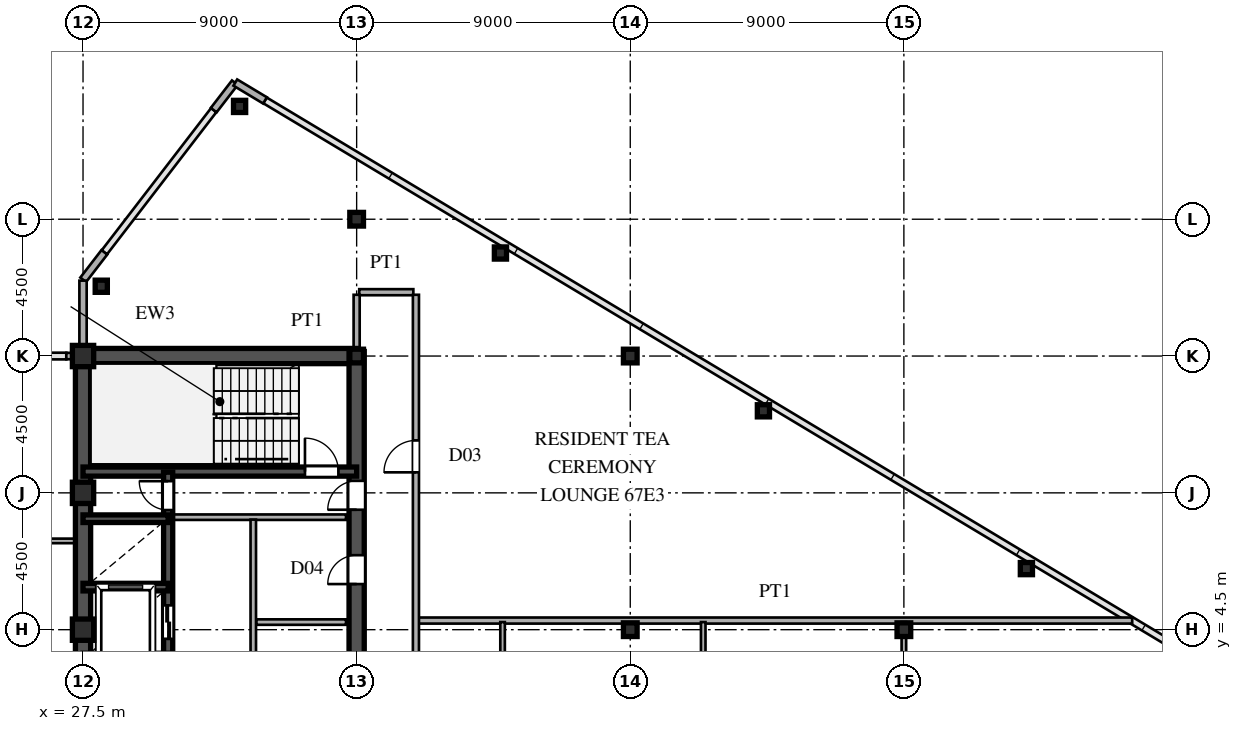
"""IFC4 building model, lengths in metres.
Left out: names, types, materials, properties, quantities, classifications, styles, units other than length and angle.
Written with IfcOpenShell. Run it as: python <this file> out.ifc"""

import sys

from ifc_helpers import new_model, si_unit, direction, frame, frame_2d, origin, origin_2d, place, context, subcontext, project, spatial, rectangle, hollow_rectangle, i_section, extrude, source, transform, mapped, element, fill, save


model = new_model("IFC4")
c1 = context("Model", 3, precision=1e-05, world=origin(), true_north=direction((0.0, 1.0)))
c2 = subcontext(c1, "Body", "Model", "MODEL_VIEW")
j1 = project(units=[si_unit("LENGTHUNIT", "METRE"), si_unit("PLANEANGLEUNIT", "RADIAN")], contexts=[c1])
p1 = place(None, origin())
s1 = spatial("IfcSite", under=j1, at=p1, CompositionType="ELEMENT")
p2 = place(p1, origin())
s2 = spatial("IfcBuilding", under=s1, at=p2, CompositionType="ELEMENT")
p3 = place(p2, frame((0.0, 0.0, 254.4)))
s3 = spatial("IfcBuildingStorey", under=s2, at=p3, CompositionType="ELEMENT", Elevation=254.4)
m1 = source(origin(), c2, "Body", "SweptSolid", [
    extrude(hollow_rectangle(XDim=0.7, YDim=0.7, WallThickness=0.03, at=origin_2d()), origin(), (0.0, 0.0, 1.0), 3.75),
])
for number, where, z_axis, x_axis in (
    (1, (27.5, 4.5, 0.0), (0.0, 0.0, 1.0), (1.0, 0.0, 0.0)),
    (2, (27.5, 9.0, 0.0), (0.0, 0.0, 1.0), (1.0, 0.0, 0.0)),
    (3, (27.5, 13.5, 0.0), (0.0, 0.0, 1.0), (1.0, 0.0, 0.0)),
):
    element("IfcColumn", number, at=place(p3, frame(where, z_axis=z_axis, x_axis=x_axis)), inside=s3, PredefinedType="COLUMN", context=c2, shape_type="MappedRepresentation", body=[
        mapped(m1, transform((0.0, 0.0, 0.0), scale=1.0)),
    ])
m2 = source(origin(), c2, "Body", "SweptSolid", [
    extrude(i_section(OverallWidth=0.45, OverallDepth=0.45, WebThickness=0.016, FlangeThickness=0.025, at=origin_2d()), origin(), (0.0, 0.0, 1.0), 3.75),
])
for number, where, z_axis, x_axis in (
    (4, (36.5, 13.5, 0.0), (0.0, 0.0, 1.0), (1.0, 0.0, 0.0)),
    (5, (36.5, 18.0, 0.0), (0.0, 0.0, 1.0), (1.0, 0.0, 0.0)),
    (6, (45.5, 4.5, 0.0), (0.0, 0.0, 1.0), (1.0, 0.0, 0.0)),
    (7, (45.5, 13.5, 0.0), (0.0, 0.0, 1.0), (1.0, 0.0, 0.0)),
    (8, (54.5, 4.5, 0.0), (0.0, 0.0, 1.0), (1.0, 0.0, 0.0)),
):
    element("IfcColumn", number, at=place(p3, frame(where, z_axis=z_axis, x_axis=x_axis)), inside=s3, PredefinedType="COLUMN", context=c2, shape_type="MappedRepresentation", body=[
        mapped(m2, transform((0.0, 0.0, 0.0), scale=1.0)),
    ])
m3 = source(origin(), c2, "Body", "SweptSolid", [
    extrude(hollow_rectangle(XDim=0.4, YDim=0.4, WallThickness=0.016, at=origin_2d()), origin(), (0.0, 0.0, 1.0), 3.75),
])
for number, where, z_axis, x_axis in (
    (9, (32.65, 21.71, 0.0), (0.0, 0.0, 1.0), (1.0, 0.0, 0.0)),
    (10, (28.1, 15.796, 0.0), (0.0, 0.0, 1.0), (1.0, 0.0, 0.0)),
    (11, (41.23, 16.889, 0.0), (0.0, 0.0, 1.0), (1.0, 0.0, 0.0)),
    (12, (49.88, 11.699, 0.0), (0.0, 0.0, 1.0), (1.0, 0.0, 0.0)),
    (13, (58.53, 6.509, 0.0), (0.0, 0.0, 1.0), (1.0, 0.0, 0.0)),
):
    element("IfcColumn", number, at=place(p3, frame(where, z_axis=z_axis, x_axis=x_axis)), inside=s3, PredefinedType="COLUMN", context=c2, shape_type="MappedRepresentation", body=[
        mapped(m3, transform((0.0, 0.0, 0.0), scale=1.0)),
    ])
for number, where, z_axis, x_axis in (
    (14, (33.486, 21.908, 0.0), (0.0, 0.0, 1.0), (-0.857, 0.515, 0.0)),
    (15, (32.494, 22.492, 0.0), (0.0, 0.0, 1.0), (-0.61, -0.793, 0.0)),
    (16, (28.201, 16.912, 0.0), (0.0, 0.0, 1.0), (-0.61, -0.793, 0.0)),
):
    element("IfcWall", number, at=place(p3, frame(where, z_axis=z_axis, x_axis=x_axis)), inside=s3, PredefinedType="SOLIDWALL", context=c2, shape_type="SweptSolid", body=[
        extrude(rectangle(XDim=1.14, YDim=0.24, at=frame_2d((0.57, 0.0))), origin(), (0.0, 0.0, 1.0), 3.53),
    ])
p4 = place(p3, frame((27.5, 13.755, 0.0), z_axis=(0.0, 0.0, 1.0), x_axis=(0.0, 1.0, 0.0)))
e17 = element("IfcWall", 17, at=p4, inside=s3, PredefinedType="SOLIDWALL", context=c2, shape_type="SweptSolid", body=[
    extrude(rectangle(XDim=0.62, YDim=0.24, at=frame_2d((0.31, 0.0))), origin(), (0.0, 0.0, 1.0), 3.03),
])
p5 = place(p3, frame((27.5, 14.375, 0.0), z_axis=(0.0, 0.0, 1.0), x_axis=(0.0, 1.0, 0.0)))
e18 = element("IfcWall", 18, at=p5, inside=s3, PredefinedType="SOLIDWALL", context=c2, shape_type="SweptSolid", body=[
    extrude(rectangle(XDim=1.605, YDim=0.24, at=frame_2d((0.803, 0.0))), origin(), (0.0, 0.0, 1.0), 3.53),
])
p6 = place(p3, frame((26.95, 13.5, 0.0), z_axis=(0.0, 0.0, 1.0), x_axis=(1.0, 0.0, 0.0)))
e19 = element("IfcWall", 19, at=p6, inside=s3, PredefinedType="SOLIDWALL", context=c2, shape_type="SweptSolid", body=[
    extrude(rectangle(XDim=0.54, YDim=0.21, at=frame_2d((0.27, 0.0))), origin(), (0.0, 0.0, 1.0), 3.03),
])
p7 = place(p3, frame((27.5, 1.3, 0.0), z_axis=(0.0, 0.0, 1.0), x_axis=(0.0, 1.0, 0.0)))
e20 = element("IfcWall", 20, at=p7, inside=s3, PredefinedType="SHEAR", context=c2, shape_type="SweptSolid", body=[
    extrude(rectangle(XDim=12.2, YDim=0.5, at=frame_2d((6.1, 0.0))), origin(), (0.0, 0.0, 1.0), 3.53),
])
p8 = place(p3, frame((27.5, 13.5, 0.0), z_axis=(0.0, 0.0, 1.0), x_axis=(1.0, 0.0, 0.0)))
e21 = element("IfcWall", 21, at=p8, inside=s3, PredefinedType="SHEAR", context=c2, shape_type="SweptSolid", body=[
    extrude(rectangle(XDim=9.0, YDim=0.5, at=frame_2d((4.5, 0.0))), origin(), (0.0, 0.0, 1.0), 3.53),
])
p9 = place(p3, frame((36.5, 8.2, 0.0), z_axis=(0.0, 0.0, 1.0), x_axis=(0.0, 1.0, 0.0)))
e22 = element("IfcWall", 22, at=p9, inside=s3, PredefinedType="SHEAR", context=c2, shape_type="SweptSolid", body=[
    extrude(rectangle(XDim=5.45, YDim=0.5, at=frame_2d((2.725, 0.0))), origin(), (0.0, 0.0, 1.0), 3.53),
])
p10 = place(p9, frame((0.245, 0.0, 0.0)))
e23 = element("IfcOpeningElement", 23, at=p10, cuts=e22, PredefinedType="OPENING", context=c2, shape_type="SweptSolid", body=[
    extrude(rectangle(XDim=0.95, YDim=2.15, at=frame_2d((0.475, 1.075))), frame((0.0, 0.26, 0.0), z_axis=(0.0, -1.0, 0.0), x_axis=(1.0, 0.0, 0.0)), (0.0, 0.0, 1.0), 0.52),
])
p11 = place(p3, frame((36.5, 1.3, 0.0), z_axis=(0.0, 0.0, 1.0), x_axis=(0.0, 1.0, 0.0)))
e24 = element("IfcWall", 24, at=p11, inside=s3, PredefinedType="SHEAR", context=c2, shape_type="SweptSolid", body=[
    extrude(rectangle(XDim=3.45, YDim=0.5, at=frame_2d((1.725, 0.0))), origin(), (0.0, 0.0, 1.0), 3.53),
])
p12 = place(p11, frame((1.25, 0.0, 0.0)))
e25 = element("IfcOpeningElement", 25, at=p12, cuts=e24, PredefinedType="OPENING", context=c2, shape_type="SweptSolid", body=[
    extrude(rectangle(XDim=0.95, YDim=2.15, at=frame_2d((0.475, 1.075))), frame((0.0, 0.26, 0.0), z_axis=(0.0, -1.0, 0.0), x_axis=(1.0, 0.0, 0.0)), (0.0, 0.0, 1.0), 0.52),
])
p13 = place(p3, frame((36.5, 4.75, 0.0), z_axis=(0.0, 0.0, 1.0), x_axis=(0.0, 1.0, 0.0)))
e26 = element("IfcWall", 26, at=p13, inside=s3, PredefinedType="SHEAR", context=c2, shape_type="SweptSolid", body=[
    extrude(rectangle(XDim=3.45, YDim=0.5, at=frame_2d((1.725, 0.0))), origin(), (0.0, 0.0, 1.0), 3.53),
])
p14 = place(p13, frame((1.25, 0.0, 0.0)))
e27 = element("IfcOpeningElement", 27, at=p14, cuts=e26, PredefinedType="OPENING", context=c2, shape_type="SweptSolid", body=[
    extrude(rectangle(XDim=0.95, YDim=2.15, at=frame_2d((0.475, 1.075))), frame((0.0, 0.26, 0.0), z_axis=(0.0, -1.0, 0.0), x_axis=(1.0, 0.0, 0.0)), (0.0, 0.0, 1.0), 0.52),
])
p15 = place(p3, frame((27.5, 9.7, 0.0), z_axis=(0.0, 0.0, 1.0), x_axis=(1.0, 0.0, 0.0)))
e28 = element("IfcWall", 28, at=p15, inside=s3, PredefinedType="SHEAR", context=c2, shape_type="SweptSolid", body=[
    extrude(rectangle(XDim=9.0, YDim=0.3, at=frame_2d((4.5, 0.0))), origin(), (0.0, 0.0, 1.0), 3.53),
])
p16 = place(p15, frame((7.3, 0.0, 0.0)))
e29 = element("IfcOpeningElement", 29, at=p16, cuts=e28, PredefinedType="OPENING", context=c2, shape_type="SweptSolid", body=[
    extrude(rectangle(XDim=1.1, YDim=2.2, at=frame_2d((0.55, 1.1))), frame((0.0, 0.16, 0.0), z_axis=(0.0, -1.0, 0.0), x_axis=(1.0, 0.0, 0.0)), (0.0, 0.0, 1.0), 0.32),
])
for number, where, z_axis, x_axis in (
    (30, (27.5, 5.9, 0.0), (0.0, 0.0, 1.0), (1.0, 0.0, 0.0)),
    (31, (27.5, 8.15, 0.0), (0.0, 0.0, 1.0), (1.0, 0.0, 0.0)),
):
    element("IfcWall", number, at=place(p3, frame(where, z_axis=z_axis, x_axis=x_axis)), inside=s3, PredefinedType="SHEAR", context=c2, shape_type="SweptSolid", body=[
        extrude(rectangle(XDim=2.8, YDim=0.25, at=frame_2d((1.4, 0.0))), origin(), (0.0, 0.0, 1.0), 3.53),
    ])
p17 = place(p3, frame((30.3, 3.6, 0.0), z_axis=(0.0, 0.0, 1.0), x_axis=(0.0, 1.0, 0.0)))
e32 = element("IfcWall", 32, at=p17, inside=s3, PredefinedType="SHEAR", context=c2, shape_type="SweptSolid", body=[
    extrude(rectangle(XDim=2.3, YDim=0.3, at=frame_2d((1.15, 0.0))), origin(), (0.0, 0.0, 1.0), 3.53),
])
p18 = place(p17, frame((0.6, 0.0, 0.0)))
e33 = element("IfcOpeningElement", 33, at=p18, cuts=e32, PredefinedType="OPENING", context=c2, shape_type="SweptSolid", body=[
    extrude(rectangle(XDim=1.1, YDim=2.2, at=frame_2d((0.55, 1.1))), frame((0.0, 0.16, 0.0), z_axis=(0.0, -1.0, 0.0), x_axis=(1.0, 0.0, 0.0)), (0.0, 0.0, 1.0), 0.32),
])
p19 = place(p3, frame((30.3, 5.9, 0.0), z_axis=(0.0, 0.0, 1.0), x_axis=(0.0, 1.0, 0.0)))
e34 = element("IfcWall", 34, at=p19, inside=s3, PredefinedType="SHEAR", context=c2, shape_type="SweptSolid", body=[
    extrude(rectangle(XDim=2.25, YDim=0.3, at=frame_2d((1.125, 0.0))), origin(), (0.0, 0.0, 1.0), 3.53),
])
p20 = place(p3, frame((30.3, 8.15, 0.0), z_axis=(0.0, 0.0, 1.0), x_axis=(0.0, 1.0, 0.0)))
e35 = element("IfcWall", 35, at=p20, inside=s3, PredefinedType="SHEAR", context=c2, shape_type="SweptSolid", body=[
    extrude(rectangle(XDim=1.53, YDim=0.3, at=frame_2d((0.765, 0.0))), origin(), (0.0, 0.0, 1.0), 3.53),
])
p21 = place(p20, frame((0.285, 0.0, 0.0)))
e36 = element("IfcOpeningElement", 36, at=p21, cuts=e35, PredefinedType="OPENING", context=c2, shape_type="SweptSolid", body=[
    extrude(rectangle(XDim=0.95, YDim=2.15, at=frame_2d((0.475, 1.075))), frame((0.0, 0.16, 0.0), z_axis=(0.0, -1.0, 0.0), x_axis=(1.0, 0.0, 0.0)), (0.0, 0.0, 1.0), 0.32),
])
p22 = place(p3, frame((30.45, 8.2, 0.0), z_axis=(0.0, 0.0, 1.0), x_axis=(1.0, 0.0, 0.0)))
e37 = element("IfcWall", 37, at=p22, inside=s3, PredefinedType="PARTITIONING", context=c2, shape_type="SweptSolid", body=[
    extrude(rectangle(XDim=5.7, YDim=0.18, at=frame_2d((2.85, 0.0))), origin(), (0.0, 0.0, 1.0), 3.53),
])
p23 = place(p3, frame((33.1, 1.38, 0.0), z_axis=(0.0, 0.0, 1.0), x_axis=(0.0, 1.0, 0.0)))
e38 = element("IfcWall", 38, at=p23, inside=s3, PredefinedType="PARTITIONING", context=c2, shape_type="SweptSolid", body=[
    extrude(rectangle(XDim=6.74, YDim=0.18, at=frame_2d((3.37, 0.0))), origin(), (0.0, 0.0, 1.0), 3.53),
])
p24 = place(p3, frame((33.2, 4.75, 0.0), z_axis=(0.0, 0.0, 1.0), x_axis=(1.0, 0.0, 0.0)))
e39 = element("IfcWall", 39, at=p24, inside=s3, PredefinedType="PARTITIONING", context=c2, shape_type="SweptSolid", body=[
    extrude(rectangle(XDim=2.95, YDim=0.18, at=frame_2d((1.475, 0.0))), origin(), (0.0, 0.0, 1.0), 3.53),
])
p25 = place(p3, frame((38.53, 4.8, 0.0), z_axis=(0.0, 0.0, 1.0), x_axis=(1.0, 0.0, 0.0)))
e40 = element("IfcWall", 40, at=p25, inside=s3, PredefinedType="PARTITIONING", context=c2, shape_type="SweptSolid", body=[
    extrude(rectangle(XDim=23.48, YDim=0.2, at=frame_2d((11.74, 0.0))), origin(), (0.0, 0.0, 1.0), 3.53),
])
p26 = place(p3, frame((7.085, 7.42, 0.0), z_axis=(0.0, 0.0, 1.0), x_axis=(1.0, 0.0, 0.0)))
e41 = element("IfcWall", 41, at=p26, inside=s3, PredefinedType="PARTITIONING", context=c2, shape_type="SweptSolid", body=[
    extrude(rectangle(XDim=20.16, YDim=0.15, at=frame_2d((10.08, 0.0))), origin(), (0.0, 0.0, 1.0), 3.53),
])
p27 = place(p26, frame((3.44, 0.0, 0.0)))
e42 = element("IfcOpeningElement", 42, at=p27, cuts=e41, PredefinedType="OPENING", context=c2, shape_type="SweptSolid", body=[
    extrude(rectangle(XDim=0.95, YDim=2.15, at=frame_2d((0.475, 1.075))), frame((0.0, 0.085, 0.0), z_axis=(0.0, -1.0, 0.0), x_axis=(1.0, 0.0, 0.0)), (0.0, 0.0, 1.0), 0.17),
])
p28 = place(p26, frame((10.69, 0.0, 0.0)))
e43 = element("IfcOpeningElement", 43, at=p28, cuts=e41, PredefinedType="OPENING", context=c2, shape_type="SweptSolid", body=[
    extrude(rectangle(XDim=0.95, YDim=2.15, at=frame_2d((0.475, 1.075))), frame((0.0, 0.085, 0.0), z_axis=(0.0, -1.0, 0.0), x_axis=(1.0, 0.0, 0.0)), (0.0, 0.0, 1.0), 0.17),
])
p29 = place(p26, frame((16.94, 0.0, 0.0)))
e44 = element("IfcOpeningElement", 44, at=p29, cuts=e41, PredefinedType="OPENING", context=c2, shape_type="SweptSolid", body=[
    extrude(rectangle(XDim=0.95, YDim=2.15, at=frame_2d((0.475, 1.075))), frame((0.0, 0.085, 0.0), z_axis=(0.0, -1.0, 0.0), x_axis=(1.0, 0.0, 0.0)), (0.0, 0.0, 1.0), 0.17),
])
p30 = place(p3, frame((36.585, 15.6, 0.0), z_axis=(0.0, 0.0, 1.0), x_axis=(1.0, 0.0, 0.0)))
e45 = element("IfcWall", 45, at=p30, inside=s3, PredefinedType="PARTITIONING", context=c2, shape_type="SweptSolid", body=[
    extrude(rectangle(XDim=1.78, YDim=0.2, at=frame_2d((0.89, 0.0))), origin(), (0.0, 0.0, 1.0), 3.53),
])
p31 = place(p3, frame((36.5, 13.755, 0.0), z_axis=(0.0, 0.0, 1.0), x_axis=(0.0, 1.0, 0.0)))
e46 = element("IfcWall", 46, at=p31, inside=s3, PredefinedType="PARTITIONING", context=c2, shape_type="SweptSolid", body=[
    extrude(rectangle(XDim=1.76, YDim=0.2, at=frame_2d((0.88, 0.0))), origin(), (0.0, 0.0, 1.0), 2.93),
])
p32 = place(p3, frame((38.45, -15.515, 0.0), z_axis=(0.0, 0.0, 1.0), x_axis=(0.0, 1.0, 0.0)))
e47 = element("IfcWall", 47, at=p32, inside=s3, PredefinedType="PARTITIONING", context=c2, shape_type="SweptSolid", body=[
    extrude(rectangle(XDim=31.03, YDim=0.2, at=frame_2d((15.515, 0.0))), origin(), (0.0, 0.0, 1.0), 3.53),
])
p33 = place(p32, frame((3.09, 0.0, 0.0)))
e48 = element("IfcOpeningElement", 48, at=p33, cuts=e47, PredefinedType="OPENING", context=c2, shape_type="SweptSolid", body=[
    extrude(rectangle(XDim=1.05, YDim=2.25, at=frame_2d((0.525, 1.125))), frame((0.0, 0.11, 0.0), z_axis=(0.0, -1.0, 0.0), x_axis=(1.0, 0.0, 0.0)), (0.0, 0.0, 1.0), 0.22),
])
p34 = place(p32, frame((13.095, 0.0, 0.0)))
e49 = element("IfcOpeningElement", 49, at=p34, cuts=e47, PredefinedType="OPENING", context=c2, shape_type="SweptSolid", body=[
    extrude(rectangle(XDim=1.05, YDim=2.25, at=frame_2d((0.525, 1.125))), frame((0.0, 0.11, 0.0), z_axis=(0.0, -1.0, 0.0), x_axis=(1.0, 0.0, 0.0)), (0.0, 0.0, 1.0), 0.22),
])
p35 = place(p32, frame((25.19, 0.0, 0.0)))
e50 = element("IfcOpeningElement", 50, at=p35, cuts=e47, PredefinedType="OPENING", context=c2, shape_type="SweptSolid", body=[
    extrude(rectangle(XDim=1.05, YDim=2.25, at=frame_2d((0.525, 1.125))), frame((0.0, 0.11, 0.0), z_axis=(0.0, -1.0, 0.0), x_axis=(1.0, 0.0, 0.0)), (0.0, 0.0, 1.0), 0.22),
])
p36 = place(p3, frame((41.3, 0.952, 0.0), z_axis=(0.0, 0.0, 1.0), x_axis=(0.0, 1.0, 0.0)))
e51 = element("IfcWall", 51, at=p36, inside=s3, PredefinedType="PARTITIONING", context=c2, shape_type="SweptSolid", body=[
    extrude(rectangle(XDim=3.798, YDim=0.15, at=frame_2d((1.899, 0.0))), origin(), (0.0, 0.0, 1.0), 3.53),
])
p37 = place(p3, frame((47.9, -8.15, 0.0), z_axis=(0.0, 0.0, 1.0), x_axis=(0.0, 1.0, 0.0)))
e52 = element("IfcWall", 52, at=p37, inside=s3, PredefinedType="PARTITIONING", context=c2, shape_type="SweptSolid", body=[
    extrude(rectangle(XDim=12.9, YDim=0.15, at=frame_2d((6.45, 0.0))), origin(), (0.0, 0.0, 1.0), 3.53),
])
p38 = place(p37, frame((5.975, 0.0, 0.0)))
e53 = element("IfcOpeningElement", 53, at=p38, cuts=e52, PredefinedType="OPENING", context=c2, shape_type="SweptSolid", body=[
    extrude(rectangle(XDim=0.95, YDim=2.15, at=frame_2d((0.475, 1.075))), frame((0.0, 0.085, 0.0), z_axis=(0.0, -1.0, 0.0), x_axis=(1.0, 0.0, 0.0)), (0.0, 0.0, 1.0), 0.17),
])
p39 = place(p37, frame((1.642, 0.0, 0.0)))
e54 = element("IfcOpeningElement", 54, at=p39, cuts=e52, PredefinedType="OPENING", context=c2, shape_type="SweptSolid", body=[
    extrude(rectangle(XDim=0.95, YDim=2.15, at=frame_2d((0.475, 1.075))), frame((0.0, 0.085, 0.0), z_axis=(0.0, -1.0, 0.0), x_axis=(1.0, 0.0, 0.0)), (0.0, 0.0, 1.0), 0.17),
])
p40 = place(p3, frame((54.5, -8.15, 0.0), z_axis=(0.0, 0.0, 1.0), x_axis=(0.0, 1.0, 0.0)))
e55 = element("IfcWall", 55, at=p40, inside=s3, PredefinedType="PARTITIONING", context=c2, shape_type="SweptSolid", body=[
    extrude(rectangle(XDim=12.9, YDim=0.15, at=frame_2d((6.45, 0.0))), origin(), (0.0, 0.0, 1.0), 2.93),
])
p41 = place(p40, frame((5.975, 0.0, 0.0)))
e56 = element("IfcOpeningElement", 56, at=p41, cuts=e55, PredefinedType="OPENING", context=c2, shape_type="SweptSolid", body=[
    extrude(rectangle(XDim=0.95, YDim=2.15, at=frame_2d((0.475, 1.075))), frame((0.0, 0.085, 0.0), z_axis=(0.0, -1.0, 0.0), x_axis=(1.0, 0.0, 0.0)), (0.0, 0.0, 1.0), 0.17),
])
p42 = place(p40, frame((1.642, 0.0, 0.0)))
e57 = element("IfcOpeningElement", 57, at=p42, cuts=e55, PredefinedType="OPENING", context=c2, shape_type="SweptSolid", body=[
    extrude(rectangle(XDim=0.95, YDim=2.15, at=frame_2d((0.475, 1.075))), frame((0.0, 0.085, 0.0), z_axis=(0.0, -1.0, 0.0), x_axis=(1.0, 0.0, 0.0)), (0.0, 0.0, 1.0), 0.17),
])
p43 = place(p40, frame((10.308, 0.0, 0.0)))
e58 = element("IfcOpeningElement", 58, at=p43, cuts=e55, PredefinedType="OPENING", context=c2, shape_type="SweptSolid", body=[
    extrude(rectangle(XDim=0.95, YDim=2.15, at=frame_2d((0.475, 1.075))), frame((0.0, 0.085, 0.0), z_axis=(0.0, -1.0, 0.0), x_axis=(1.0, 0.0, 0.0)), (0.0, 0.0, 1.0), 0.17),
])
m4 = source(origin(), c2, "Body", "SweptSolid", [
    extrude(rectangle(XDim=0.95, YDim=2.15, at=frame_2d((0.475, 1.075))), frame((0.0, 0.025, 0.0), z_axis=(0.0, -1.0, 0.0), x_axis=(1.0, 0.0, 0.0)), (0.0, 0.0, 1.0), 0.05),
])
p44 = place(p10, origin())
e59 = element("IfcDoor", 59, at=p44, inside=s3, OperationType="SINGLE_SWING_LEFT", PredefinedType="DOOR", context=c2, shape_type="MappedRepresentation", body=[
    mapped(m4, transform((0.0, 0.0, 0.0), scale=1.0)),
])
fill(e23, e59)
p45 = place(p14, origin())
e60 = element("IfcDoor", 60, at=p45, inside=s3, OperationType="SINGLE_SWING_LEFT", PredefinedType="DOOR", context=c2, shape_type="MappedRepresentation", body=[
    mapped(m4, transform((0.0, 0.0, 0.0), scale=1.0)),
])
fill(e27, e60)
m5 = source(origin(), c2, "Body", "SweptSolid", [
    extrude(rectangle(XDim=1.1, YDim=2.2, at=frame_2d((0.55, 1.1))), frame((0.0, 0.025, 0.0), z_axis=(0.0, -1.0, 0.0), x_axis=(1.0, 0.0, 0.0)), (0.0, 0.0, 1.0), 0.05),
])
p46 = place(p16, origin())
e61 = element("IfcDoor", 61, at=p46, inside=s3, OperationType="SINGLE_SWING_LEFT", PredefinedType="DOOR", context=c2, shape_type="MappedRepresentation", body=[
    mapped(m5, transform((0.0, 0.0, 0.0), scale=1.0)),
])
fill(e29, e61)
m6 = source(origin(), c2, "Body", "SweptSolid", [
    extrude(rectangle(XDim=1.1, YDim=2.2, at=frame_2d((0.55, 1.1))), frame((0.0, 0.025, 0.0), z_axis=(0.0, -1.0, 0.0), x_axis=(1.0, 0.0, 0.0)), (0.0, 0.0, 1.0), 0.05),
])
p47 = place(p18, origin())
e62 = element("IfcDoor", 62, at=p47, inside=s3, OperationType="DOUBLE_DOOR_SLIDING", PredefinedType="DOOR", context=c2, shape_type="MappedRepresentation", body=[
    mapped(m6, transform((0.0, 0.0, 0.0), scale=1.0)),
])
fill(e33, e62)
p48 = place(p21, origin())
e63 = element("IfcDoor", 63, at=p48, inside=s3, OperationType="SINGLE_SWING_RIGHT", PredefinedType="DOOR", context=c2, shape_type="MappedRepresentation", body=[
    mapped(m4, transform((0.0, 0.0, 0.0), scale=1.0)),
])
fill(e36, e63)
m7 = source(origin(), c2, "Body", "SweptSolid", [
    extrude(rectangle(XDim=1.05, YDim=2.25, at=frame_2d((0.525, 1.125))), frame((0.0, 0.025, 0.0), z_axis=(0.0, -1.0, 0.0), x_axis=(1.0, 0.0, 0.0)), (0.0, 0.0, 1.0), 0.05),
])
p49 = place(p35, origin())
e64 = element("IfcDoor", 64, at=p49, inside=s3, OperationType="SINGLE_SWING_LEFT", PredefinedType="DOOR", context=c2, shape_type="MappedRepresentation", body=[
    mapped(m7, transform((0.0, 0.0, 0.0), scale=1.0)),
])
fill(e50, e64)
save(model, sys.argv[1])
